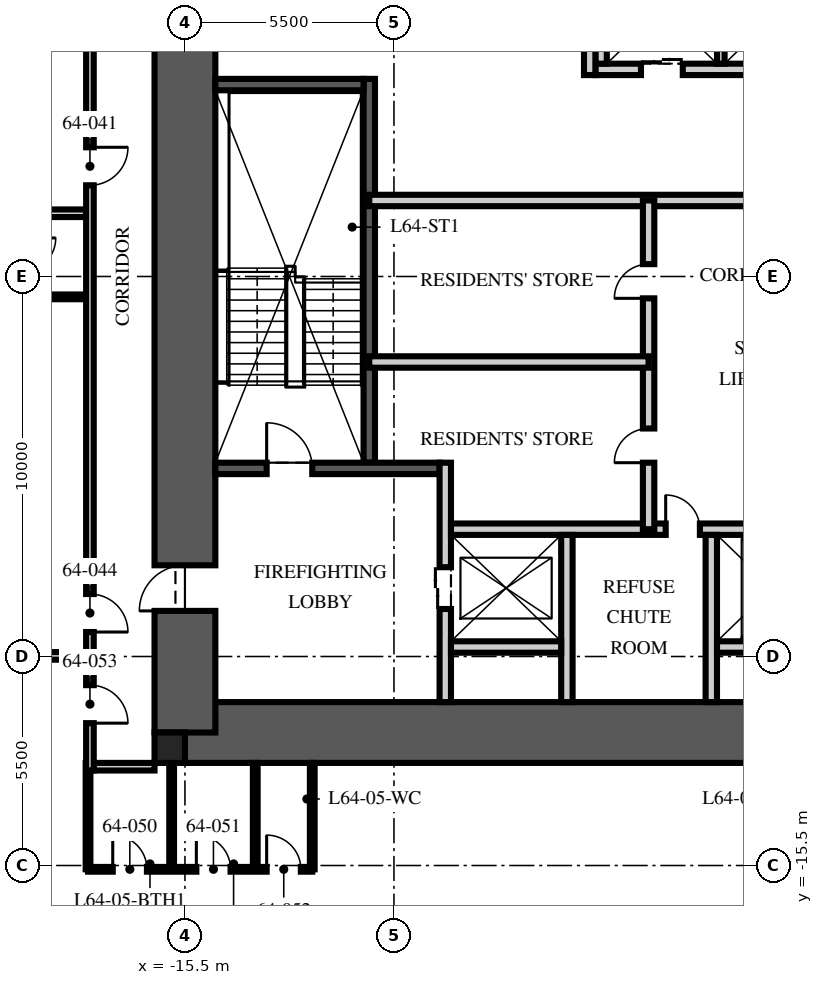
"""IFC4 building model, lengths in metres.
Left out: names, types, materials, properties, quantities, classifications, styles, units other than length and angle.
Written with IfcOpenShell. Run it as: python <this file> out.ifc"""

import sys

from ifc_helpers import new_model, si_unit, direction, frame, frame_2d, origin, origin_2d, place, context, subcontext, project, spatial, rectangle, extrude, element, fill, save


model = new_model("IFC4")
c1 = context("Model", 3, precision=1e-05, world=origin(), true_north=direction((0.0, 1.0)))
c2 = subcontext(c1, "Body", "Model", "MODEL_VIEW")
j1 = project(units=[si_unit("LENGTHUNIT", "METRE"), si_unit("PLANEANGLEUNIT", "RADIAN")], contexts=[c1])
p1 = place(None, origin())
s1 = spatial("IfcSite", under=j1, at=p1, CompositionType="ELEMENT")
p2 = place(p1, origin())
s2 = spatial("IfcBuilding", under=s1, at=p2, CompositionType="ELEMENT")
p3 = place(p2, frame((0.0, 0.0, 255.75)))
s3 = spatial("IfcBuildingStorey", under=s2, at=p3, CompositionType="ELEMENT", Elevation=255.75)
p4 = place(p3, frame((-15.5, -12.0, -0.25), z_axis=(0.0, 0.0, 1.0), x_axis=(1.0, 0.0, 0.0)))
e1 = element("IfcWall", 1, at=p4, inside=s3, PredefinedType="SHEAR", context=c2, shape_type="SweptSolid", body=[
    extrude(rectangle(XDim=31.0, YDim=1.6, at=frame_2d((15.5, 0.0))), origin(), (0.0, 0.0, 1.0), 3.75),
])
p5 = place(p3, frame((-15.5, -12.0, -0.25), z_axis=(0.0, 0.0, 1.0), x_axis=(0.0, 1.0, 0.0)))
e2 = element("IfcWall", 2, at=p5, inside=s3, PredefinedType="SHEAR", context=c2, shape_type="SweptSolid", body=[
    extrude(rectangle(XDim=24.0, YDim=1.6, at=frame_2d((12.0, 0.0))), origin(), (0.0, 0.0, 1.0), 3.75),
])
p6 = place(p5, frame((3.2, 0.0, 0.25)))
e3 = element("IfcOpeningElement", 3, at=p6, cuts=e2, PredefinedType="OPENING", context=c2, shape_type="SweptSolid", body=[
    extrude(rectangle(XDim=1.2, YDim=2.1, at=frame_2d((0.6, 1.05))), frame((0.0, 0.81, 0.0), z_axis=(0.0, -1.0, 0.0), x_axis=(1.0, 0.0, 0.0)), (0.0, 0.0, 1.0), 1.62),
])
p7 = place(p5, frame((19.3, 0.0, 0.25)))
e4 = element("IfcOpeningElement", 4, at=p7, cuts=e2, PredefinedType="OPENING", context=c2, shape_type="SweptSolid", body=[
    extrude(rectangle(XDim=1.8, YDim=2.1, at=frame_2d((0.9, 1.05))), frame((0.0, 0.81, 0.0), z_axis=(0.0, -1.0, 0.0), x_axis=(1.0, 0.0, 0.0)), (0.0, 0.0, 1.0), 1.62),
])
p8 = place(p3, frame((-15.9, -12.4, -0.25), z_axis=(0.0, 0.0, 1.0), x_axis=(1.0, 0.0, 0.0)))
e5 = element("IfcColumn", 5, at=p8, inside=s3, PredefinedType="COLUMN", context=c2, shape_type="SweptSolid", body=[
    extrude(rectangle(XDim=0.8, YDim=0.8, at=origin_2d()), origin(), (0.0, 0.0, 1.0), 3.75),
])
p9 = place(p3, frame((-10.65, -4.9, 0.0), z_axis=(0.0, 0.0, 1.0), x_axis=(0.0, 1.0, 0.0)))
e6 = element("IfcWall", 6, at=p9, inside=s3, PredefinedType="SOLIDWALL", context=c2, shape_type="SweptSolid", body=[
    extrude(rectangle(XDim=10.1, YDim=0.3, at=frame_2d((5.05, 0.0))), origin(), (0.0, 0.0, 1.0), 3.5),
])
p10 = place(p3, frame((-14.7, -5.05, 0.0), z_axis=(0.0, 0.0, 1.0), x_axis=(1.0, 0.0, 0.0)))
e7 = element("IfcWall", 7, at=p10, inside=s3, PredefinedType="SOLIDWALL", context=c2, shape_type="SweptSolid", body=[
    extrude(rectangle(XDim=5.9, YDim=0.3, at=frame_2d((2.95, 0.0))), origin(), (0.0, 0.0, 1.0), 3.5),
])
p11 = place(p10, frame((1.35, 0.0, 0.0)))
e8 = element("IfcOpeningElement", 8, at=p11, cuts=e7, PredefinedType="OPENING", context=c2, shape_type="SweptSolid", body=[
    extrude(rectangle(XDim=1.2, YDim=2.1, at=frame_2d((0.6, 1.05))), frame((0.0, 0.16, 0.0), z_axis=(0.0, -1.0, 0.0), x_axis=(1.0, 0.0, 0.0)), (0.0, 0.0, 1.0), 0.32),
])
p12 = place(p3, frame((-14.7, 5.05, 0.0), z_axis=(0.0, 0.0, 1.0), x_axis=(1.0, 0.0, 0.0)))
e9 = element("IfcWall", 9, at=p12, inside=s3, PredefinedType="SOLIDWALL", context=c2, shape_type="SweptSolid", body=[
    extrude(rectangle(XDim=3.9, YDim=0.3, at=frame_2d((1.95, 0.0))), origin(), (0.0, 0.0, 1.0), 3.5),
])
p13 = place(p3, frame((-8.65, -11.2, 0.0), z_axis=(0.0, 0.0, 1.0), x_axis=(0.0, 1.0, 0.0)))
e10 = element("IfcWall", 10, at=p13, inside=s3, PredefinedType="PARTITIONING", context=c2, shape_type="SweptSolid", body=[
    extrude(rectangle(XDim=6.3, YDim=0.3, at=frame_2d((3.15, 0.0))), origin(), (0.0, 0.0, 1.0), 3.5),
])
p14 = place(p13, frame((2.45, 0.0, 0.0)))
e11 = element("IfcOpeningElement", 11, at=p14, cuts=e10, PredefinedType="OPENING", context=c2, shape_type="SweptSolid", body=[
    extrude(rectangle(XDim=1.1, YDim=2.1, at=frame_2d((0.55, 1.05))), frame((0.0, 0.16, 0.0), z_axis=(0.0, -1.0, 0.0), x_axis=(1.0, 0.0, 0.0)), (0.0, 0.0, 1.0), 0.32),
])
p15 = place(p3, frame((-8.5, -6.65, 0.0), z_axis=(0.0, 0.0, 1.0), x_axis=(1.0, 0.0, 0.0)))
e12 = element("IfcWall", 12, at=p15, inside=s3, PredefinedType="PARTITIONING", context=c2, shape_type="SweptSolid", body=[
    extrude(rectangle(XDim=17.0, YDim=0.3, at=frame_2d((8.5, 0.0))), origin(), (0.0, 0.0, 1.0), 3.5),
])
p16 = place(p15, frame((7.8, 0.0, 0.0)))
e13 = element("IfcOpeningElement", 13, at=p16, cuts=e12, PredefinedType="OPENING", context=c2, shape_type="SweptSolid", body=[
    extrude(rectangle(XDim=1.3, YDim=2.4, at=frame_2d((0.65, 1.2))), frame((0.0, 0.16, 0.0), z_axis=(0.0, -1.0, 0.0), x_axis=(1.0, 0.0, 0.0)), (0.0, 0.0, 1.0), 0.32),
])
p17 = place(p15, frame((5.65, 0.0, 0.0)))
e14 = element("IfcOpeningElement", 14, at=p17, cuts=e12, PredefinedType="OPENING", context=c2, shape_type="SweptSolid", body=[
    extrude(rectangle(XDim=0.9, YDim=2.1, at=frame_2d((0.45, 1.05))), frame((0.0, 0.16, 0.0), z_axis=(0.0, -1.0, 0.0), x_axis=(1.0, 0.0, 0.0)), (0.0, 0.0, 1.0), 0.32),
])
p18 = place(p15, frame((10.4, 0.0, 0.0)))
e15 = element("IfcOpeningElement", 15, at=p18, cuts=e12, PredefinedType="OPENING", context=c2, shape_type="SweptSolid", body=[
    extrude(rectangle(XDim=0.9, YDim=2.1, at=frame_2d((0.45, 1.05))), frame((0.0, 0.16, 0.0), z_axis=(0.0, -1.0, 0.0), x_axis=(1.0, 0.0, 0.0)), (0.0, 0.0, 1.0), 0.32),
])
for number, where, z_axis, x_axis in (
    (16, (-5.45, -11.2, 0.0), (0.0, 0.0, 1.0), (0.0, 1.0, 0.0)),
    (17, (-1.65, -11.2, 0.0), (0.0, 0.0, 1.0), (0.0, 1.0, 0.0)),
):
    element("IfcWall", number, at=place(p3, frame(where, z_axis=z_axis, x_axis=x_axis)), inside=s3, PredefinedType="PARTITIONING", context=c2, shape_type="SweptSolid", body=[
        extrude(rectangle(XDim=4.4, YDim=0.3, at=frame_2d((2.2, 0.0))), origin(), (0.0, 0.0, 1.0), 3.5),
    ])
for number, where, z_axis, x_axis in (
    (18, (-8.5, -9.75, 0.0), (0.0, 0.0, 1.0), (1.0, 0.0, 0.0)),
    (19, (-1.5, -9.75, 0.0), (0.0, 0.0, 1.0), (1.0, 0.0, 0.0)),
):
    element("IfcWall", number, at=place(p3, frame(where, z_axis=z_axis, x_axis=x_axis)), inside=s3, PredefinedType="PARTITIONING", context=c2, shape_type="SweptSolid", body=[
        extrude(rectangle(XDim=2.9, YDim=0.3, at=frame_2d((1.45, 0.0))), origin(), (0.0, 0.0, 1.0), 3.5),
    ])
p19 = place(p3, frame((-4.7, 5.45, 0.0), z_axis=(0.0, 0.0, 1.0), x_axis=(1.0, 0.0, 0.0)))
e20 = element("IfcWall", 20, at=p19, inside=s3, PredefinedType="PARTITIONING", context=c2, shape_type="SweptSolid", body=[
    extrude(rectangle(XDim=9.7, YDim=0.3, at=frame_2d((4.85, 0.0))), origin(), (0.0, 0.0, 1.0), 3.5),
])
p20 = place(p19, frame((1.2, 0.0, 0.0)))
e21 = element("IfcOpeningElement", 21, at=p20, cuts=e20, PredefinedType="OPENING", context=c2, shape_type="SweptSolid", body=[
    extrude(rectangle(XDim=1.1, YDim=2.1, at=frame_2d((0.55, 1.05))), frame((0.0, 0.16, 0.0), z_axis=(0.0, -1.0, 0.0), x_axis=(1.0, 0.0, 0.0)), (0.0, 0.0, 1.0), 0.32),
])
p21 = place(p19, frame((4.3, 0.0, 0.0)))
e22 = element("IfcOpeningElement", 22, at=p21, cuts=e20, PredefinedType="OPENING", context=c2, shape_type="SweptSolid", body=[
    extrude(rectangle(XDim=1.1, YDim=2.1, at=frame_2d((0.55, 1.05))), frame((0.0, 0.16, 0.0), z_axis=(0.0, -1.0, 0.0), x_axis=(1.0, 0.0, 0.0)), (0.0, 0.0, 1.0), 0.32),
])
p22 = place(p19, frame((7.4, 0.0, 0.0)))
e23 = element("IfcOpeningElement", 23, at=p22, cuts=e20, PredefinedType="OPENING", context=c2, shape_type="SweptSolid", body=[
    extrude(rectangle(XDim=1.1, YDim=2.1, at=frame_2d((0.55, 1.05))), frame((0.0, 0.16, 0.0), z_axis=(0.0, -1.0, 0.0), x_axis=(1.0, 0.0, 0.0)), (0.0, 0.0, 1.0), 0.32),
])
p23 = place(p3, frame((-4.55, 5.6, 0.0), z_axis=(0.0, 0.0, 1.0), x_axis=(0.0, 1.0, 0.0)))
e24 = element("IfcWall", 24, at=p23, inside=s3, PredefinedType="PARTITIONING", context=c2, shape_type="SweptSolid", body=[
    extrude(rectangle(XDim=2.8, YDim=0.3, at=frame_2d((1.4, 0.0))), origin(), (0.0, 0.0, 1.0), 3.5),
])
p24 = place(p3, frame((-1.4, 5.6, 0.0), z_axis=(0.0, 0.0, 1.0), x_axis=(0.0, 1.0, 0.0)))
e25 = element("IfcWall", 25, at=p24, inside=s3, PredefinedType="PARTITIONING", context=c2, shape_type="SweptSolid", body=[
    extrude(rectangle(XDim=2.8, YDim=0.2, at=frame_2d((1.4, 0.0))), origin(), (0.0, 0.0, 1.0), 3.5),
])
p25 = place(p3, frame((-10.65, 2.0, 0.0), z_axis=(0.0, 0.0, 1.0), x_axis=(1.0, 0.0, 0.0)))
e26 = element("IfcWall", 26, at=p25, inside=s3, PredefinedType="PARTITIONING", context=c2, shape_type="SweptSolid", body=[
    extrude(rectangle(XDim=21.3, YDim=0.3, at=frame_2d((10.65, 0.0))), origin(), (0.0, 0.0, 1.0), 3.5),
])
p26 = place(p25, frame((10.05, 0.0, 0.0)))
e27 = element("IfcOpeningElement", 27, at=p26, cuts=e26, PredefinedType="OPENING", context=c2, shape_type="SweptSolid", body=[
    extrude(rectangle(XDim=1.2, YDim=2.1, at=frame_2d((0.6, 1.05))), frame((0.0, 0.16, 0.0), z_axis=(0.0, -1.0, 0.0), x_axis=(1.0, 0.0, 0.0)), (0.0, 0.0, 1.0), 0.32),
])
p27 = place(p25, frame((18.942, 0.0, 0.0)))
e28 = element("IfcOpeningElement", 28, at=p27, cuts=e26, PredefinedType="OPENING", context=c2, shape_type="SweptSolid", body=[
    extrude(rectangle(XDim=0.9, YDim=2.1, at=frame_2d((0.45, 1.05))), frame((0.0, 0.16, 0.0), z_axis=(0.0, -1.0, 0.0), x_axis=(1.0, 0.0, 0.0)), (0.0, 0.0, 1.0), 0.32),
])
p28 = place(p3, frame((-3.3, -6.65, 0.0), z_axis=(0.0, 0.0, 1.0), x_axis=(0.0, 1.0, 0.0)))
e29 = element("IfcWall", 29, at=p28, inside=s3, PredefinedType="PARTITIONING", context=c2, shape_type="SweptSolid", body=[
    extrude(rectangle(XDim=8.65, YDim=0.3, at=frame_2d((4.325, 0.0))), origin(), (0.0, 0.0, 1.0), 3.5),
])
p29 = place(p28, frame((1.75, 0.0, 0.0)))
e30 = element("IfcOpeningElement", 30, at=p29, cuts=e29, PredefinedType="OPENING", context=c2, shape_type="SweptSolid", body=[
    extrude(rectangle(XDim=0.9, YDim=2.1, at=frame_2d((0.45, 1.05))), frame((0.0, 0.16, 0.0), z_axis=(0.0, -1.0, 0.0), x_axis=(1.0, 0.0, 0.0)), (0.0, 0.0, 1.0), 0.32),
])
p30 = place(p28, frame((6.075, 0.0, 0.0)))
e31 = element("IfcOpeningElement", 31, at=p30, cuts=e29, PredefinedType="OPENING", context=c2, shape_type="SweptSolid", body=[
    extrude(rectangle(XDim=0.9, YDim=2.1, at=frame_2d((0.45, 1.05))), frame((0.0, 0.16, 0.0), z_axis=(0.0, -1.0, 0.0), x_axis=(1.0, 0.0, 0.0)), (0.0, 0.0, 1.0), 0.32),
])
p31 = place(p3, frame((-10.65, -2.25, 0.0), z_axis=(0.0, 0.0, 1.0), x_axis=(1.0, 0.0, 0.0)))
e32 = element("IfcWall", 32, at=p31, inside=s3, PredefinedType="PARTITIONING", context=c2, shape_type="SweptSolid", body=[
    extrude(rectangle(XDim=7.35, YDim=0.3, at=frame_2d((3.675, 0.0))), origin(), (0.0, 0.0, 1.0), 3.5),
])
p32 = place(p3, frame((-4.85, 5.3, 0.0), z_axis=(0.0, 0.0, 1.0), x_axis=(0.0, 1.0, 0.0)))
e33 = element("IfcWall", 33, at=p32, inside=s3, PredefinedType="PARTITIONING", context=c2, shape_type="SweptSolid", body=[
    extrude(rectangle(XDim=5.9, YDim=0.3, at=frame_2d((2.95, 0.0))), origin(), (0.0, 0.0, 1.0), 3.5),
])
p33 = place(p32, frame((4.15, 0.0, 0.0)))
e34 = element("IfcOpeningElement", 34, at=p33, cuts=e33, PredefinedType="OPENING", context=c2, shape_type="SweptSolid", body=[
    extrude(rectangle(XDim=0.9, YDim=2.1, at=frame_2d((0.45, 1.05))), frame((0.0, 0.16, 0.0), z_axis=(0.0, -1.0, 0.0), x_axis=(1.0, 0.0, 0.0)), (0.0, 0.0, 1.0), 0.32),
])
p34 = place(p3, frame((-16.3, -12.9, 0.0), z_axis=(0.0, 0.0, 1.0), x_axis=(-1.0, 0.0, 0.0)))
e35 = element("IfcWall", 35, at=p34, inside=s3, PredefinedType="PARTITIONING", context=c2, shape_type="SweptSolid", body=[
    extrude(rectangle(XDim=1.6, YDim=0.2, at=frame_2d((0.8, 0.0))), origin(), (0.0, 0.0, 1.0), 2.3),
])
for number, where, z_axis, x_axis in (
    (36, (-18.1, 1.664, 0.0), (0.0, 0.0, 1.0), (-1.0, 0.0, 0.0)),
    (37, (-18.1, -9.984, 0.0), (0.0, 0.0, 1.0), (-1.0, 0.0, 0.0)),
):
    element("IfcWall", number, at=place(p3, frame(where, z_axis=z_axis, x_axis=x_axis)), inside=s3, PredefinedType="PARTITIONING", context=c2, shape_type="SweptSolid", body=[
        extrude(rectangle(XDim=7.6, YDim=0.2, at=frame_2d((3.8, 0.0))), origin(), (0.0, 0.0, 1.0), 2.91),
    ])
p35 = place(p3, frame((-18.1, -0.536, 0.0), z_axis=(0.0, 0.0, 1.0), x_axis=(-1.0, 0.0, 0.0)))
e38 = element("IfcWall", 38, at=p35, inside=s3, PredefinedType="PARTITIONING", context=c2, shape_type="SweptSolid", body=[
    extrude(rectangle(XDim=1.7, YDim=0.125, at=frame_2d((0.85, 0.0))), origin(), (0.0, 0.0, 1.0), 3.5),
])
p36 = place(p3, frame((-18.05, -15.6, 0.0), z_axis=(0.0, 0.0, 1.0), x_axis=(1.0, 0.0, 0.0)))
e39 = element("IfcWall", 39, at=p36, inside=s3, PredefinedType="PARTITIONING", context=c2, shape_type="SweptSolid", body=[
    extrude(rectangle(XDim=5.9, YDim=0.125, at=frame_2d((2.95, 0.0))), origin(), (0.0, 0.0, 1.0), 2.3),
])
p37 = place(p36, frame((0.65, 0.0, 0.0)))
e40 = element("IfcOpeningElement", 40, at=p37, cuts=e39, PredefinedType="OPENING", context=c2, shape_type="SweptSolid", body=[
    extrude(rectangle(XDim=0.9, YDim=2.1, at=frame_2d((0.45, 1.05))), frame((0.0, 0.073, 0.0), z_axis=(0.0, -1.0, 0.0), x_axis=(1.0, 0.0, 0.0)), (0.0, 0.0, 1.0), 0.145),
])
p38 = place(p36, frame((2.85, 0.0, 0.0)))
e41 = element("IfcOpeningElement", 41, at=p38, cuts=e39, PredefinedType="OPENING", context=c2, shape_type="SweptSolid", body=[
    extrude(rectangle(XDim=0.9, YDim=2.1, at=frame_2d((0.45, 1.05))), frame((0.0, 0.073, 0.0), z_axis=(0.0, -1.0, 0.0), x_axis=(1.0, 0.0, 0.0)), (0.0, 0.0, 1.0), 0.145),
])
p39 = place(p36, frame((4.7, 0.0, 0.0)))
e42 = element("IfcOpeningElement", 42, at=p39, cuts=e39, PredefinedType="OPENING", context=c2, shape_type="SweptSolid", body=[
    extrude(rectangle(XDim=0.9, YDim=2.1, at=frame_2d((0.45, 1.05))), frame((0.0, 0.073, 0.0), z_axis=(0.0, -1.0, 0.0), x_axis=(1.0, 0.0, 0.0)), (0.0, 0.0, 1.0), 0.145),
])
for number, where, z_axis, x_axis in (
    (43, (-18.05, -12.8, 0.0), (0.0, 0.0, 1.0), (0.0, -1.0, 0.0)),
    (44, (-15.85, -12.8, 0.0), (0.0, 0.0, 1.0), (0.0, -1.0, 0.0)),
):
    element("IfcWall", number, at=place(p3, frame(where, z_axis=z_axis, x_axis=x_axis)), inside=s3, PredefinedType="PARTITIONING", context=c2, shape_type="SweptSolid", body=[
        extrude(rectangle(XDim=2.8, YDim=0.125, at=frame_2d((1.4, 0.0))), origin(), (0.0, 0.0, 1.0), 2.3),
    ])
for number, where, z_axis, x_axis in (
    (45, (-13.65, -12.8, 0.0), (0.0, 0.0, 1.0), (0.0, -1.0, 0.0)),
    (46, (-12.15, -12.8, 0.0), (0.0, 0.0, 1.0), (0.0, -1.0, 0.0)),
):
    element("IfcWall", number, at=place(p3, frame(where, z_axis=z_axis, x_axis=x_axis)), inside=s3, PredefinedType="PARTITIONING", context=c2, shape_type="SweptSolid", body=[
        extrude(rectangle(XDim=2.8, YDim=0.125, at=frame_2d((1.4, 0.0))), origin(), (0.0, 0.0, 1.0), 3.5),
    ])
p40 = place(p3, frame((-18.0, 13.0, 0.0), z_axis=(0.0, 0.0, 1.0), x_axis=(0.0, -1.0, 0.0)))
e47 = element("IfcWall", 47, at=p40, inside=s3, PredefinedType="PARTITIONING", context=c2, shape_type="SweptSolid", body=[
    extrude(rectangle(XDim=26.0, YDim=0.2, at=frame_2d((13.0, 0.0))), origin(), (0.0, 0.0, 1.0), 2.6),
])
p41 = place(p40, frame((9.6, 0.0, 0.0)))
e48 = element("IfcOpeningElement", 48, at=p41, cuts=e47, PredefinedType="OPENING", context=c2, shape_type="SweptSolid", body=[
    extrude(rectangle(XDim=1.0, YDim=2.2, at=frame_2d((0.5, 1.1))), frame((0.0, 0.11, 0.0), z_axis=(0.0, -1.0, 0.0), x_axis=(1.0, 0.0, 0.0)), (0.0, 0.0, 1.0), 0.22),
])
p42 = place(p40, frame((21.356, 0.0, 0.0)))
e49 = element("IfcOpeningElement", 49, at=p42, cuts=e47, PredefinedType="OPENING", context=c2, shape_type="SweptSolid", body=[
    extrude(rectangle(XDim=1.0, YDim=2.2, at=frame_2d((0.5, 1.1))), frame((0.0, 0.11, 0.0), z_axis=(0.0, -1.0, 0.0), x_axis=(1.0, 0.0, 0.0)), (0.0, 0.0, 1.0), 0.22),
])
p43 = place(p40, frame((23.754, 0.0, 0.0)))
e50 = element("IfcOpeningElement", 50, at=p43, cuts=e47, PredefinedType="OPENING", context=c2, shape_type="SweptSolid", body=[
    extrude(rectangle(XDim=1.0, YDim=2.2, at=frame_2d((0.5, 1.1))), frame((0.0, 0.11, 0.0), z_axis=(0.0, -1.0, 0.0), x_axis=(1.0, 0.0, 0.0)), (0.0, 0.0, 1.0), 0.22),
])
p44 = place(p11, origin())
e51 = element("IfcDoor", 51, at=p44, inside=s3, OperationType="SINGLE_SWING_LEFT", PredefinedType="DOOR", context=c2, shape_type="SweptSolid", body=[
    extrude(rectangle(XDim=1.2, YDim=2.1, at=frame_2d((0.6, 1.05))), frame((0.0, 0.025, 0.0), z_axis=(0.0, -1.0, 0.0), x_axis=(1.0, 0.0, 0.0)), (0.0, 0.0, 1.0), 0.05),
])
fill(e8, e51)
p45 = place(p6, origin())
e52 = element("IfcDoor", 52, at=p45, inside=s3, OperationType="SINGLE_SWING_LEFT", PredefinedType="DOOR", context=c2, shape_type="SweptSolid", body=[
    extrude(rectangle(XDim=1.2, YDim=2.1, at=frame_2d((0.6, 1.05))), frame((0.0, 0.025, 0.0), z_axis=(0.0, -1.0, 0.0), x_axis=(1.0, 0.0, 0.0)), (0.0, 0.0, 1.0), 0.05),
])
fill(e3, e52)
p46 = place(p14, origin())
e53 = element("IfcDoor", 53, at=p46, inside=s3, OperationType="DOUBLE_DOOR_SLIDING", PredefinedType="DOOR", context=c2, shape_type="SweptSolid", body=[
    extrude(rectangle(XDim=1.1, YDim=2.1, at=frame_2d((0.55, 1.05))), frame((0.0, 0.025, 0.0), z_axis=(0.0, -1.0, 0.0), x_axis=(1.0, 0.0, 0.0)), (0.0, 0.0, 1.0), 0.05),
])
fill(e11, e53)
p47 = place(p20, origin())
e54 = element("IfcDoor", 54, at=p47, inside=s3, OperationType="DOUBLE_DOOR_SLIDING", PredefinedType="DOOR", context=c2, shape_type="SweptSolid", body=[
    extrude(rectangle(XDim=1.1, YDim=2.1, at=frame_2d((0.55, 1.05))), frame((0.0, 0.025, 0.0), z_axis=(0.0, -1.0, 0.0), x_axis=(1.0, 0.0, 0.0)), (0.0, 0.0, 1.0), 0.05),
])
fill(e21, e54)
p48 = place(p17, origin())
e55 = element("IfcDoor", 55, at=p48, inside=s3, OperationType="SINGLE_SWING_LEFT", PredefinedType="DOOR", context=c2, shape_type="SweptSolid", body=[
    extrude(rectangle(XDim=0.9, YDim=2.1, at=frame_2d((0.45, 1.05))), frame((0.0, 0.025, 0.0), z_axis=(0.0, -1.0, 0.0), x_axis=(1.0, 0.0, 0.0)), (0.0, 0.0, 1.0), 0.05),
])
fill(e14, e55)
p49 = place(p29, origin())
e56 = element("IfcDoor", 56, at=p49, inside=s3, OperationType="SINGLE_SWING_LEFT", PredefinedType="DOOR", context=c2, shape_type="SweptSolid", body=[
    extrude(rectangle(XDim=0.9, YDim=2.1, at=frame_2d((0.45, 1.05))), frame((0.0, 0.025, 0.0), z_axis=(0.0, -1.0, 0.0), x_axis=(1.0, 0.0, 0.0)), (0.0, 0.0, 1.0), 0.05),
])
fill(e30, e56)
p50 = place(p30, origin())
e57 = element("IfcDoor", 57, at=p50, inside=s3, OperationType="SINGLE_SWING_LEFT", PredefinedType="DOOR", context=c2, shape_type="SweptSolid", body=[
    extrude(rectangle(XDim=0.9, YDim=2.1, at=frame_2d((0.45, 1.05))), frame((0.0, 0.025, 0.0), z_axis=(0.0, -1.0, 0.0), x_axis=(1.0, 0.0, 0.0)), (0.0, 0.0, 1.0), 0.05),
])
fill(e31, e57)
p51 = place(p41, origin())
e58 = element("IfcDoor", 58, at=p51, inside=s3, OperationType="SINGLE_SWING_LEFT", PredefinedType="DOOR", context=c2, shape_type="SweptSolid", body=[
    extrude(rectangle(XDim=1.0, YDim=2.2, at=frame_2d((0.5, 1.1))), frame((0.0, 0.025, 0.0), z_axis=(0.0, -1.0, 0.0), x_axis=(1.0, 0.0, 0.0)), (0.0, 0.0, 1.0), 0.05),
])
fill(e48, e58)
p52 = place(p42, origin())
e59 = element("IfcDoor", 59, at=p52, inside=s3, OperationType="SINGLE_SWING_RIGHT", PredefinedType="DOOR", context=c2, shape_type="SweptSolid", body=[
    extrude(rectangle(XDim=1.0, YDim=2.2, at=frame_2d((0.5, 1.1))), frame((0.0, 0.025, 0.0), z_axis=(0.0, -1.0, 0.0), x_axis=(1.0, 0.0, 0.0)), (0.0, 0.0, 1.0), 0.05),
])
fill(e49, e59)
p53 = place(p37, origin())
e60 = element("IfcDoor", 60, at=p53, inside=s3, OperationType="SINGLE_SWING_LEFT", PredefinedType="DOOR", context=c2, shape_type="SweptSolid", body=[
    extrude(rectangle(XDim=0.9, YDim=2.1, at=frame_2d((0.45, 1.05))), frame((0.0, 0.025, 0.0), z_axis=(0.0, -1.0, 0.0), x_axis=(1.0, 0.0, 0.0)), (0.0, 0.0, 1.0), 0.05),
])
fill(e40, e60)
p54 = place(p38, origin())
e61 = element("IfcDoor", 61, at=p54, inside=s3, OperationType="SINGLE_SWING_LEFT", PredefinedType="DOOR", context=c2, shape_type="SweptSolid", body=[
    extrude(rectangle(XDim=0.9, YDim=2.1, at=frame_2d((0.45, 1.05))), frame((0.0, 0.025, 0.0), z_axis=(0.0, -1.0, 0.0), x_axis=(1.0, 0.0, 0.0)), (0.0, 0.0, 1.0), 0.05),
])
fill(e41, e61)
p55 = place(p39, origin())
e62 = element("IfcDoor", 62, at=p55, inside=s3, OperationType="SINGLE_SWING_LEFT", PredefinedType="DOOR", context=c2, shape_type="SweptSolid", body=[
    extrude(rectangle(XDim=0.9, YDim=2.1, at=frame_2d((0.45, 1.05))), frame((0.0, 0.025, 0.0), z_axis=(0.0, -1.0, 0.0), x_axis=(1.0, 0.0, 0.0)), (0.0, 0.0, 1.0), 0.05),
])
fill(e42, e62)
p56 = place(p43, origin())
e63 = element("IfcDoor", 63, at=p56, inside=s3, OperationType="SINGLE_SWING_RIGHT", PredefinedType="DOOR", context=c2, shape_type="SweptSolid", body=[
    extrude(rectangle(XDim=1.0, YDim=2.2, at=frame_2d((0.5, 1.1))), frame((0.0, 0.025, 0.0), z_axis=(0.0, -1.0, 0.0), x_axis=(1.0, 0.0, 0.0)), (0.0, 0.0, 1.0), 0.05),
])
fill(e50, e63)
save(model, sys.argv[1])
